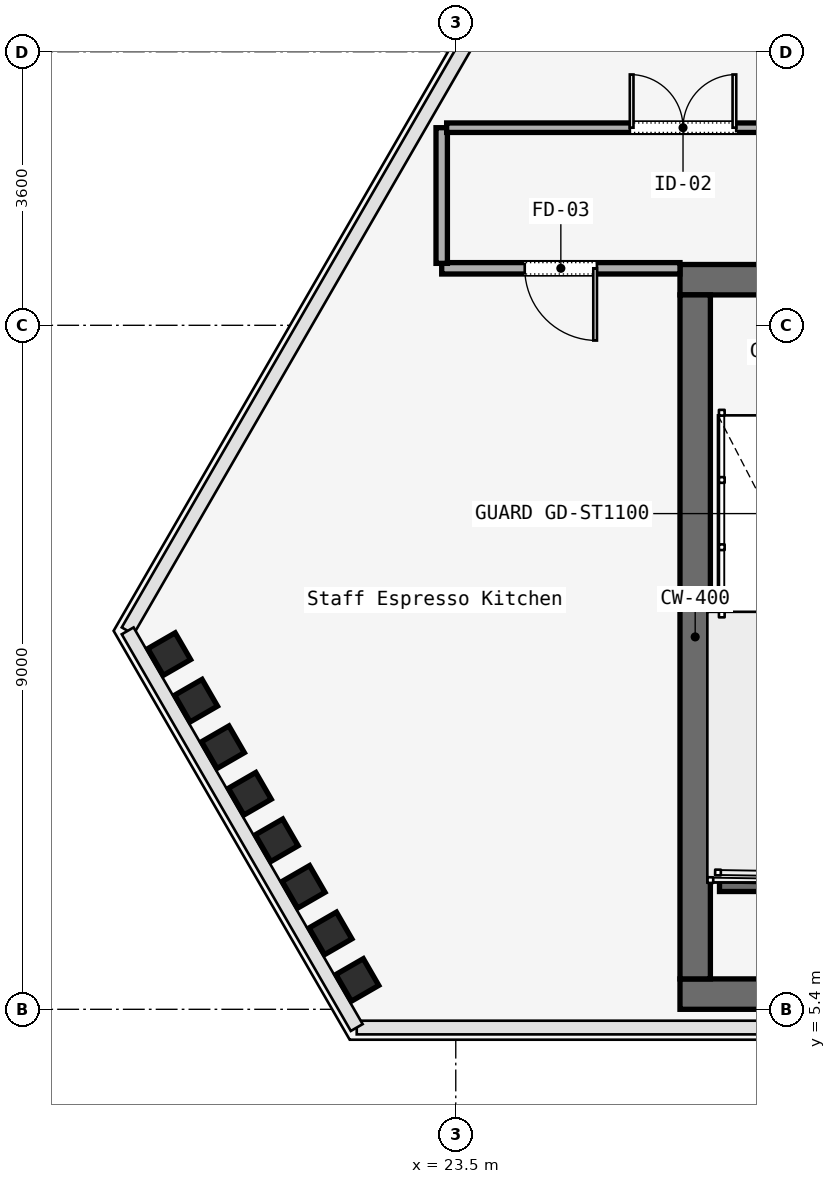
"""IFC4 building model, lengths in metres.
Left out: names, types, materials, properties, quantities, classifications, styles, units other than length and angle.
Written with IfcOpenShell. Run it as: python <this file> out.ifc"""

import sys

from ifc_helpers import new_model, si_unit, direction, frame, frame_2d, origin, origin_2d, place, context, subcontext, project, spatial, rectangle, i_section, extrude, element, fill, save


model = new_model("IFC4")
c1 = context("Model", 3, precision=1e-05, world=origin(), true_north=direction((0.0, 1.0)))
c2 = subcontext(c1, "Body", "Model", "MODEL_VIEW")
j1 = project(units=[si_unit("LENGTHUNIT", "METRE"), si_unit("PLANEANGLEUNIT", "RADIAN")], contexts=[c1])
p1 = place(None, origin())
s1 = spatial("IfcSite", under=j1, at=p1, CompositionType="ELEMENT")
p2 = place(p1, origin())
s2 = spatial("IfcBuilding", under=s1, at=p2, CompositionType="ELEMENT")
p3 = place(p2, frame((0.0, 0.0, 259.8)))
s3 = spatial("IfcBuildingStorey", under=s2, at=p3, CompositionType="ELEMENT", Elevation=259.8)
p4 = place(p3, frame((26.45, 15.0, 0.0), z_axis=(0.0, 0.0, 1.0), x_axis=(1.0, 0.0, 0.0)))
e1 = element("IfcWall", 1, at=p4, inside=s3, PredefinedType="SOLIDWALL", context=c2, shape_type="SweptSolid", body=[
    extrude(rectangle(XDim=31.1, YDim=0.4, at=frame_2d((15.55, 0.0))), origin(), (0.0, 0.0, 1.0), 3.58),
])
p5 = place(p4, frame((1.65, 0.0, 0.0)))
e2 = element("IfcOpeningElement", 2, at=p5, cuts=e1, PredefinedType="OPENING", context=c2, shape_type="SweptSolid", body=[
    extrude(rectangle(XDim=1.1, YDim=2.2, at=frame_2d((0.55, 1.1))), frame((0.0, 0.2, 0.0), z_axis=(0.0, -1.0, 0.0), x_axis=(1.0, 0.0, 0.0)), (0.0, 0.0, 1.0), 0.4),
])
p6 = place(p4, frame((13.65, 0.0, 0.0)))
e3 = element("IfcOpeningElement", 3, at=p6, cuts=e1, PredefinedType="OPENING", context=c2, shape_type="SweptSolid", body=[
    extrude(rectangle(XDim=1.1, YDim=2.2, at=frame_2d((0.55, 1.1))), frame((0.0, 0.2, 0.0), z_axis=(0.0, -1.0, 0.0), x_axis=(1.0, 0.0, 0.0)), (0.0, 0.0, 1.0), 0.4),
])
p7 = place(p4, frame((25.55, 0.0, 0.0)))
e4 = element("IfcOpeningElement", 4, at=p7, cuts=e1, PredefinedType="OPENING", context=c2, shape_type="SweptSolid", body=[
    extrude(rectangle(XDim=1.1, YDim=2.2, at=frame_2d((0.55, 1.1))), frame((0.0, 0.2, 0.0), z_axis=(0.0, -1.0, 0.0), x_axis=(1.0, 0.0, 0.0)), (0.0, 0.0, 1.0), 0.4),
])
p8 = place(p4, frame((19.35, 0.0, 0.0)))
e5 = element("IfcOpeningElement", 5, at=p8, cuts=e1, PredefinedType="OPENING", context=c2, shape_type="SweptSolid", body=[
    extrude(rectangle(XDim=1.1, YDim=2.2, at=frame_2d((0.55, 1.1))), frame((0.0, 0.2, 0.0), z_axis=(0.0, -1.0, 0.0), x_axis=(1.0, 0.0, 0.0)), (0.0, 0.0, 1.0), 0.4),
])
p9 = place(p4, frame((21.4, 0.0, 0.0)))
e6 = element("IfcOpeningElement", 6, at=p9, cuts=e1, PredefinedType="OPENING", context=c2, shape_type="SweptSolid", body=[
    extrude(rectangle(XDim=0.9, YDim=2.1, at=frame_2d((0.45, 1.05))), frame((0.0, 0.2, 0.0), z_axis=(0.0, -1.0, 0.0), x_axis=(1.0, 0.0, 0.0)), (0.0, 0.0, 1.0), 0.4),
])
p10 = place(p4, frame((5.54, 0.0, 0.0)))
e7 = element("IfcOpeningElement", 7, at=p10, cuts=e1, PredefinedType="OPENING", context=c2, shape_type="SweptSolid", body=[
    extrude(rectangle(XDim=0.95, YDim=2.2, at=frame_2d((0.475, 1.1))), frame((0.0, 0.2, 0.0), z_axis=(0.0, -1.0, 0.0), x_axis=(1.0, 0.0, 0.0)), (0.0, 0.0, 1.0), 0.4),
])
p11 = place(p4, frame((9.49, 0.0, 0.0)))
e8 = element("IfcOpeningElement", 8, at=p11, cuts=e1, PredefinedType="OPENING", context=c2, shape_type="SweptSolid", body=[
    extrude(rectangle(XDim=0.95, YDim=2.2, at=frame_2d((0.475, 1.1))), frame((0.0, 0.2, 0.0), z_axis=(0.0, -1.0, 0.0), x_axis=(1.0, 0.0, 0.0)), (0.0, 0.0, 1.0), 0.4),
])
p12 = place(p4, frame((23.35, 0.0, 0.0)))
e9 = element("IfcOpeningElement", 9, at=p12, cuts=e1, PredefinedType="OPENING", context=c2, shape_type="SweptSolid", body=[
    extrude(rectangle(XDim=1.3, YDim=2.3, at=frame_2d((0.65, 1.15))), frame((0.0, 0.2, 0.0), z_axis=(0.0, -1.0, 0.0), x_axis=(1.0, 0.0, 0.0)), (0.0, 0.0, 1.0), 0.4),
])
p13 = place(p3, frame((26.45, 5.6, 0.0), z_axis=(0.0, 0.0, 1.0), x_axis=(1.0, 0.0, 0.0)))
e10 = element("IfcWall", 10, at=p13, inside=s3, PredefinedType="SOLIDWALL", context=c2, shape_type="SweptSolid", body=[
    extrude(rectangle(XDim=31.1, YDim=0.4, at=frame_2d((15.55, 0.0))), origin(), (0.0, 0.0, 1.0), 3.58),
])
p14 = place(p3, frame((26.65, 5.8, 0.0), z_axis=(0.0, 0.0, 1.0), x_axis=(0.0, 1.0, 0.0)))
e11 = element("IfcWall", 11, at=p14, inside=s3, PredefinedType="SOLIDWALL", context=c2, shape_type="SweptSolid", body=[
    extrude(rectangle(XDim=9.0, YDim=0.4, at=frame_2d((4.5, 0.0))), origin(), (0.0, 0.0, 1.0), 3.58),
])
p15 = place(p3, frame((19.73, 10.073, 0.0), z_axis=(0.046420109636, -0.127368131971, 0.990768657346), x_axis=(-0.763582650894, 0.634947584087, 0.117401451079)))
e12 = element("IfcColumn", 12, at=p15, inside=s3, PredefinedType="COLUMN", context=c2, shape_type="SweptSolid", body=[
    extrude(i_section(OverallWidth=0.406, OverallDepth=0.416, WebThickness=0.03, FlangeThickness=0.037, FilletRadius=0.015, at=origin_2d()), origin(), (0.0, 0.0, 1.0), 3.613),
])
p16 = place(p3, frame((20.083, 9.461, 0.0), z_axis=(0.036711351122, -0.110743651449, 0.993170740791), x_axis=(-0.74524466961, 0.659091399344, 0.101039149482)))
e13 = element("IfcColumn", 13, at=p16, inside=s3, PredefinedType="COLUMN", context=c2, shape_type="SweptSolid", body=[
    extrude(i_section(OverallWidth=0.406, OverallDepth=0.416, WebThickness=0.03, FlangeThickness=0.037, FilletRadius=0.015, at=origin_2d()), origin(), (0.0, 0.0, 1.0), 3.604),
])
p17 = place(p3, frame((20.437, 8.849, 0.0), z_axis=(0.026877706532, -0.093868353874, 0.995221744654), x_axis=(-0.717936594884, 0.690953534256, 0.084559205446)))
e14 = element("IfcColumn", 14, at=p17, inside=s3, PredefinedType="COLUMN", context=c2, shape_type="SweptSolid", body=[
    extrude(i_section(OverallWidth=0.406, OverallDepth=0.416, WebThickness=0.03, FlangeThickness=0.037, FilletRadius=0.015, at=origin_2d()), origin(), (0.0, 0.0, 1.0), 3.597),
])
p18 = place(p3, frame((20.791, 8.236, 0.0), z_axis=(0.017064735315, -0.076893289409, 0.99689328258), x_axis=(-0.67517089235, 0.734500802425, 0.068211709849)))
e15 = element("IfcColumn", 15, at=p18, inside=s3, PredefinedType="COLUMN", context=c2, shape_type="SweptSolid", body=[
    extrude(i_section(OverallWidth=0.406, OverallDepth=0.416, WebThickness=0.03, FlangeThickness=0.037, FilletRadius=0.015, at=origin_2d()), origin(), (0.0, 0.0, 1.0), 3.591),
])
p19 = place(p3, frame((21.144, 7.624, 0.0), z_axis=(0.007215908337, -0.059905654117, 0.998177961724), x_axis=(-0.599791024145, 0.798448595596, 0.052254832755)))
e16 = element("IfcColumn", 16, at=p19, inside=s3, PredefinedType="COLUMN", context=c2, shape_type="SweptSolid", body=[
    extrude(i_section(OverallWidth=0.406, OverallDepth=0.416, WebThickness=0.03, FlangeThickness=0.037, FilletRadius=0.015, at=origin_2d()), origin(), (0.0, 0.0, 1.0), 3.586),
])
p20 = place(p3, frame((21.498, 7.011, 0.0), z_axis=(-0.002657310403, -0.042789511113, 0.999080575549), x_axis=(-0.445409548678, 0.894556779236, 0.037128192386)))
e17 = element("IfcColumn", 17, at=p20, inside=s3, PredefinedType="COLUMN", context=c2, shape_type="SweptSolid", body=[
    extrude(i_section(OverallWidth=0.406, OverallDepth=0.416, WebThickness=0.03, FlangeThickness=0.037, FilletRadius=0.015, at=origin_2d()), origin(), (0.0, 0.0, 1.0), 3.583),
])
p21 = place(p3, frame((21.851, 6.399, 0.0), z_axis=(-0.012543459199, -0.025700457164, 0.999590990422), x_axis=(-0.069645069236, 0.997264345813, 0.024766689329)))
e18 = element("IfcColumn", 18, at=p21, inside=s3, PredefinedType="COLUMN", context=c2, shape_type="SweptSolid", body=[
    extrude(i_section(OverallWidth=0.406, OverallDepth=0.416, WebThickness=0.03, FlangeThickness=0.037, FilletRadius=0.015, at=origin_2d()), origin(), (0.0, 0.0, 1.0), 3.581),
])
p22 = place(p3, frame((22.205, 5.786, 0.0), z_axis=(-0.022499111872, -0.008522390861, 0.999710537515), x_axis=(0.632523877391, 0.774260559272, 0.020835807778)))
e19 = element("IfcColumn", 19, at=p22, inside=s3, PredefinedType="COLUMN", context=c2, shape_type="SweptSolid", body=[
    extrude(i_section(OverallWidth=0.406, OverallDepth=0.416, WebThickness=0.03, FlangeThickness=0.037, FilletRadius=0.015, at=origin_2d()), origin(), (0.0, 0.0, 1.0), 3.581),
])
p23 = place(p3, frame((26.97, 7.05, 0.0), z_axis=(0.0, 0.0, 1.0), x_axis=(1.0, 0.0, 0.0)))
e20 = element("IfcWall", 20, at=p23, inside=s3, PredefinedType="SOLIDWALL", context=c2, shape_type="SweptSolid", body=[
    extrude(rectangle(XDim=3.115, YDim=0.2, at=frame_2d((1.558, 0.0))), origin(), (0.0, 0.0, 1.0), 3.8),
])
p24 = place(p3, frame((26.45, 15.15, 0.0), z_axis=(0.0, 0.0, 1.0), x_axis=(-1.0, 0.0, 0.0)))
e21 = element("IfcWall", 21, at=p24, inside=s3, PredefinedType="PARTITIONING", context=c2, shape_type="SweptSolid", body=[
    extrude(rectangle(XDim=3.135, YDim=0.15, at=frame_2d((1.567, 0.0))), origin(), (0.0, 0.0, 1.0), 3.01),
])
p25 = place(p24, frame((1.093, 0.0, 0.0)))
e22 = element("IfcOpeningElement", 22, at=p25, cuts=e21, PredefinedType="OPENING", context=c2, shape_type="SweptSolid", body=[
    extrude(rectangle(XDim=0.95, YDim=2.2, at=frame_2d((0.475, 1.1))), frame((0.0, 0.075, 0.0), z_axis=(0.0, -1.0, 0.0), x_axis=(1.0, 0.0, 0.0)), (0.0, 0.0, 1.0), 0.15),
])
p26 = place(p3, frame((23.315, 15.215, 0.0), z_axis=(0.0, 0.0, 1.0), x_axis=(0.0, 1.0, 0.0)))
e23 = element("IfcWall", 23, at=p26, inside=s3, PredefinedType="PARTITIONING", context=c2, shape_type="SweptSolid", body=[
    extrude(rectangle(XDim=1.785, YDim=0.15, at=frame_2d((0.893, 0.0))), origin(), (0.0, 0.0, 1.0), 3.01),
])
p27 = place(p3, frame((23.38, 17.0, 0.0), z_axis=(0.0, 0.0, 1.0), x_axis=(1.0, 0.0, 0.0)))
e24 = element("IfcWall", 24, at=p27, inside=s3, PredefinedType="PARTITIONING", context=c2, shape_type="SweptSolid", body=[
    extrude(rectangle(XDim=6.22, YDim=0.125, at=frame_2d((3.11, 0.0))), origin(), (0.0, 0.0, 1.0), 3.01),
])
p28 = place(p27, frame((2.41, 0.0, 0.0)))
e25 = element("IfcOpeningElement", 25, at=p28, cuts=e24, PredefinedType="OPENING", context=c2, shape_type="SweptSolid", body=[
    extrude(rectangle(XDim=1.4, YDim=2.2, at=frame_2d((0.7, 1.1))), frame((0.0, 0.062, 0.0), z_axis=(0.0, -1.0, 0.0), x_axis=(1.0, 0.0, 0.0)), (0.0, 0.0, 1.0), 0.125),
])
p29 = place(p25, origin())
e26 = element("IfcDoor", 26, at=p29, inside=s3, OperationType="SINGLE_SWING_RIGHT", PredefinedType="DOOR", context=c2, shape_type="SweptSolid", body=[
    extrude(rectangle(XDim=0.95, YDim=2.2, at=frame_2d((0.475, 1.1))), frame((0.0, 0.025, 0.0), z_axis=(0.0, -1.0, 0.0), x_axis=(1.0, 0.0, 0.0)), (0.0, 0.0, 1.0), 0.05),
])
fill(e22, e26)
p30 = place(p28, origin())
e27 = element("IfcDoor", 27, at=p30, inside=s3, OperationType="SINGLE_SWING_RIGHT", PredefinedType="DOOR", context=c2, shape_type="SweptSolid", body=[
    extrude(rectangle(XDim=1.4, YDim=2.2, at=frame_2d((0.7, 1.1))), frame((0.0, 0.025, 0.0), z_axis=(0.0, -1.0, 0.0), x_axis=(1.0, 0.0, 0.0)), (0.0, 0.0, 1.0), 0.05),
])
fill(e25, e27)
save(model, sys.argv[1])
